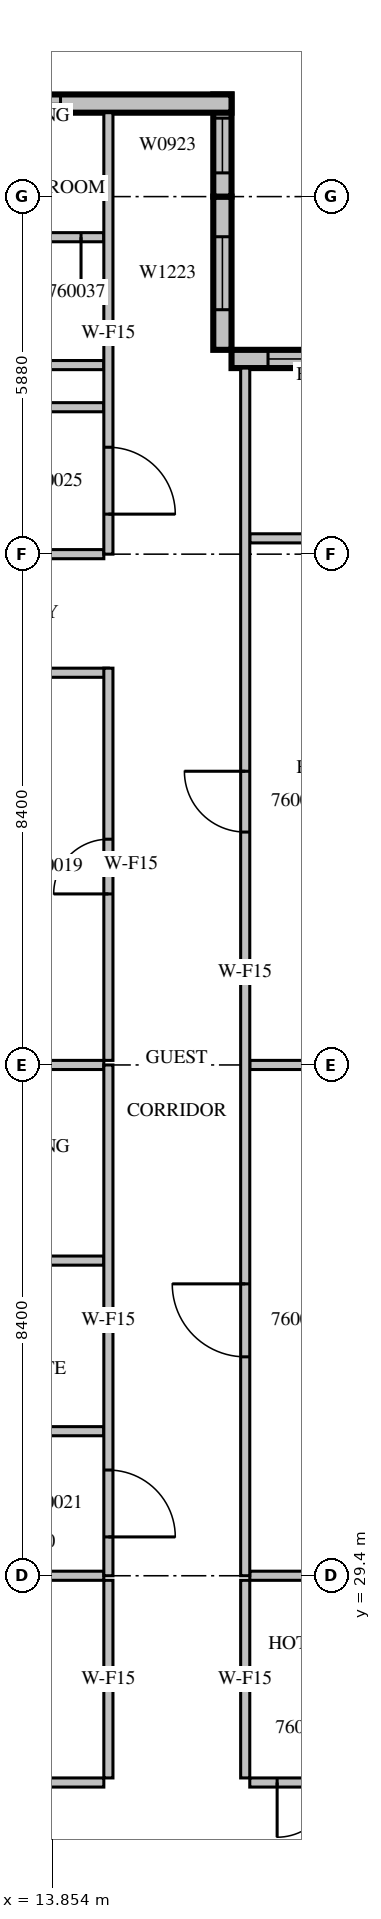
"""IFC4 building model, lengths in metres.
Left out: names, types, materials, properties, quantities, classifications, styles, units other than length and angle.
Written with IfcOpenShell. Run it as: python <this file> out.ifc"""

import sys

from ifc_helpers import new_model, si_unit, direction, frame, frame_2d, origin, place, context, subcontext, project, spatial, rectangle, extrude, source, transform, mapped, element, fill, save


model = new_model("IFC4")
c1 = context("Model", 3, precision=1e-05, world=origin(), true_north=direction((0.0, 1.0)))
c2 = subcontext(c1, "Body", "Model", "MODEL_VIEW")
j1 = project(units=[si_unit("LENGTHUNIT", "METRE"), si_unit("PLANEANGLEUNIT", "RADIAN")], contexts=[c1])
p1 = place(None, origin())
s1 = spatial("IfcSite", under=j1, at=p1, CompositionType="ELEMENT")
p2 = place(p1, origin())
s2 = spatial("IfcBuilding", under=s1, at=p2, CompositionType="ELEMENT")
p3 = place(p2, frame((0.0, 0.0, 261.4)))
s3 = spatial("IfcBuildingStorey", under=s2, at=p3, CompositionType="ELEMENT", Elevation=261.4)
m1 = source(origin(), c2, "Body", "SweptSolid", [
    extrude(rectangle(XDim=4.2, YDim=0.3, at=frame_2d((2.1, 0.0))), origin(), (0.0, 0.0, 1.0), 3.4),
])
p4 = place(p3, frame((21.0, 49.41, 0.0), z_axis=(0.0, 0.0, 1.0), x_axis=(-1.0, 0.0, 0.0)))
e1 = element("IfcWall", 1, at=p4, inside=s3, PredefinedType="STANDARD", context=c2, shape_type="MappedRepresentation", body=[
    mapped(m1, transform((0.0, 0.0, 0.0), scale=1.0)),
])
m2 = source(origin(), c2, "Body", "SweptSolid", [
    extrude(rectangle(XDim=3.0, YDim=2.3, at=frame_2d((1.5, 1.15))), frame((0.0, 0.16, 0.0), z_axis=(0.0, -1.0, 0.0), x_axis=(1.0, 0.0, 0.0)), (0.0, 0.0, 1.0), 0.32),
])
p5 = place(p4, frame((0.6, 0.0, 0.6)))
e2 = element("IfcOpeningElement", 2, at=p5, cuts=e1, PredefinedType="OPENING", context=c2, shape_type="MappedRepresentation", body=[
    mapped(m2, transform((0.0, 0.0, 0.0), scale=1.0)),
])
m3 = source(origin(), c2, "Body", "SweptSolid", [
    extrude(rectangle(XDim=2.52, YDim=0.3, at=frame_2d((1.26, 0.0))), origin(), (0.0, 0.0, 1.0), 3.4),
])
p6 = place(p3, frame((16.65, 49.56, 0.0), z_axis=(0.0, 0.0, 1.0), x_axis=(0.0, 1.0, 0.0)))
e3 = element("IfcWall", 3, at=p6, inside=s3, PredefinedType="STANDARD", context=c2, shape_type="MappedRepresentation", body=[
    mapped(m3, transform((0.0, 0.0, 0.0), scale=1.0)),
])
m4 = source(origin(), c2, "Body", "SweptSolid", [
    extrude(rectangle(XDim=1.2, YDim=2.3, at=frame_2d((0.6, 1.15))), frame((0.0, 0.16, 0.0), z_axis=(0.0, -1.0, 0.0), x_axis=(1.0, 0.0, 0.0)), (0.0, 0.0, 1.0), 0.32),
])
p7 = place(p6, frame((0.66, 0.0, 0.6)))
e4 = element("IfcOpeningElement", 4, at=p7, cuts=e3, PredefinedType="OPENING", context=c2, shape_type="MappedRepresentation", body=[
    mapped(m4, transform((0.0, 0.0, 0.0), scale=1.0)),
])
m5 = source(origin(), c2, "Body", "SweptSolid", [
    extrude(rectangle(XDim=1.68, YDim=0.3, at=frame_2d((0.84, 0.0))), origin(), (0.0, 0.0, 1.0), 3.4),
])
p8 = place(p3, frame((16.65, 52.08, 0.0), z_axis=(0.0, 0.0, 1.0), x_axis=(0.0, 1.0, 0.0)))
e5 = element("IfcWall", 5, at=p8, inside=s3, PredefinedType="STANDARD", context=c2, shape_type="MappedRepresentation", body=[
    mapped(m5, transform((0.0, 0.0, 0.0), scale=1.0)),
])
m6 = source(origin(), c2, "Body", "SweptSolid", [
    extrude(rectangle(XDim=0.9, YDim=2.3, at=frame_2d((0.45, 1.15))), frame((0.0, 0.16, 0.0), z_axis=(0.0, -1.0, 0.0), x_axis=(1.0, 0.0, 0.0)), (0.0, 0.0, 1.0), 0.32),
])
p9 = place(p8, frame((0.39, 0.0, 0.6)))
e6 = element("IfcOpeningElement", 6, at=p9, cuts=e5, PredefinedType="OPENING", context=c2, shape_type="MappedRepresentation", body=[
    mapped(m6, transform((0.0, 0.0, 0.0), scale=1.0)),
])
m7 = source(origin(), c2, "Body", "SweptSolid", [
    extrude(rectangle(XDim=10.5, YDim=0.3, at=frame_2d((5.25, 0.0))), origin(), (0.0, 0.0, 1.0), 3.4),
])
p10 = place(p3, frame((16.8, 53.61, 0.0), z_axis=(0.0, 0.0, 1.0), x_axis=(-1.0, 0.0, 0.0)))
e7 = element("IfcWall", 7, at=p10, inside=s3, PredefinedType="STANDARD", context=c2, shape_type="MappedRepresentation", body=[
    mapped(m7, transform((0.0, 0.0, 0.0), scale=1.0)),
])
m8 = source(origin(), c2, "Body", "SweptSolid", [
    extrude(rectangle(XDim=1.8, YDim=2.3, at=frame_2d((0.9, 1.15))), frame((0.0, 0.16, 0.0), z_axis=(0.0, -1.0, 0.0), x_axis=(1.0, 0.0, 0.0)), (0.0, 0.0, 1.0), 0.32),
])
p11 = place(p10, frame((8.025, 0.0, 0.6)))
e8 = element("IfcOpeningElement", 8, at=p11, cuts=e7, PredefinedType="OPENING", context=c2, shape_type="MappedRepresentation", body=[
    mapped(m8, transform((0.0, 0.0, 0.0), scale=1.0)),
])
m9 = source(origin(), c2, "Body", "SweptSolid", [
    extrude(rectangle(XDim=2.4, YDim=2.3, at=frame_2d((1.2, 1.15))), frame((0.0, 0.16, 0.0), z_axis=(0.0, -1.0, 0.0), x_axis=(1.0, 0.0, 0.0)), (0.0, 0.0, 1.0), 0.32),
])
p12 = place(p10, frame((2.812, 0.0, 0.6)))
e9 = element("IfcOpeningElement", 9, at=p12, cuts=e7, PredefinedType="OPENING", context=c2, shape_type="MappedRepresentation", body=[
    mapped(m9, transform((0.0, 0.0, 0.0), scale=1.0)),
])
m10 = source(origin(), c2, "Body", "SweptSolid", [
    extrude(rectangle(XDim=8.195, YDim=0.15, at=frame_2d((4.098, 0.0))), origin(), (0.0, 0.0, 1.0), 3.4),
])
p13 = place(p3, frame((6.505, 26.0, 0.0), z_axis=(0.0, 0.0, 1.0), x_axis=(1.0, 0.0, 0.0)))
e10 = element("IfcWall", 10, at=p13, inside=s3, PredefinedType="PARTITIONING", context=c2, shape_type="MappedRepresentation", body=[
    mapped(m10, transform((0.0, 0.0, 0.0), scale=1.0)),
])
m11 = source(origin(), c2, "Body", "SweptSolid", [
    extrude(rectangle(XDim=0.9, YDim=2.1, at=frame_2d((0.45, 1.05))), frame((0.0, 0.085, 0.0), z_axis=(0.0, -1.0, 0.0), x_axis=(1.0, 0.0, 0.0)), (0.0, 0.0, 1.0), 0.17),
])
p14 = place(p13, frame((0.695, 0.0, 0.0)))
e11 = element("IfcOpeningElement", 11, at=p14, cuts=e10, PredefinedType="OPENING", context=c2, shape_type="MappedRepresentation", body=[
    mapped(m11, transform((0.0, 0.0, 0.0), scale=1.0)),
])
p15 = place(p13, frame((5.62, 0.0, 0.0)))
e12 = element("IfcOpeningElement", 12, at=p15, cuts=e10, PredefinedType="OPENING", context=c2, shape_type="MappedRepresentation", body=[
    mapped(m11, transform((0.0, 0.0, 0.0), scale=1.0)),
])
m12 = source(origin(), c2, "Body", "SweptSolid", [
    extrude(rectangle(XDim=3.6, YDim=0.15, at=frame_2d((1.8, 0.0))), origin(), (0.0, 0.0, 1.0), 3.4),
])
p16 = place(p3, frame((17.1, 26.0, 0.0), z_axis=(0.0, 0.0, 1.0), x_axis=(1.0, 0.0, 0.0)))
e13 = element("IfcWall", 13, at=p16, inside=s3, PredefinedType="PARTITIONING", context=c2, shape_type="MappedRepresentation", body=[
    mapped(m12, transform((0.0, 0.0, 0.0), scale=1.0)),
])
p17 = place(p16, frame((0.45, 0.0, 0.0)))
e14 = element("IfcOpeningElement", 14, at=p17, cuts=e13, PredefinedType="OPENING", context=c2, shape_type="MappedRepresentation", body=[
    mapped(m11, transform((0.0, 0.0, 0.0), scale=1.0)),
])
m13 = source(origin(), c2, "Body", "SweptSolid", [
    extrude(rectangle(XDim=3.25, YDim=0.15, at=frame_2d((1.625, 0.0))), origin(), (0.0, 0.0, 1.0), 3.4),
])
for number, where, z_axis, x_axis in (
    (15, (14.775, 26.075, 0.0), (0.0, 0.0, 1.0), (0.0, 1.0, 0.0)),
    (16, (17.025, 29.325, 0.0), (0.0, 0.0, 1.0), (0.0, -1.0, 0.0)),
):
    element("IfcWall", number, at=place(p3, frame(where, z_axis=z_axis, x_axis=x_axis)), inside=s3, PredefinedType="PARTITIONING", context=c2, shape_type="MappedRepresentation", body=[
        mapped(m13, transform((0.0, 0.0, 0.0), scale=1.0)),
    ])
m14 = source(origin(), c2, "Body", "SweptSolid", [
    extrude(rectangle(XDim=3.801, YDim=0.15, at=frame_2d((1.901, 0.0))), origin(), (0.0, 0.0, 1.0), 3.4),
])
p18 = place(p3, frame((14.7, 29.4, 0.0), z_axis=(0.0, 0.0, 1.0), x_axis=(-1.0, 0.0, 0.0)))
e17 = element("IfcWall", 17, at=p18, inside=s3, PredefinedType="PARTITIONING", context=c2, shape_type="MappedRepresentation", body=[
    mapped(m14, transform((0.0, 0.0, 0.0), scale=1.0)),
])
m15 = source(origin(), c2, "Body", "SweptSolid", [
    extrude(rectangle(XDim=3.101, YDim=0.15, at=frame_2d((1.55, 0.0))), origin(), (0.0, 0.0, 1.0), 3.4),
])
p19 = place(p3, frame((20.201, 29.4, 0.0), z_axis=(0.0, 0.0, 1.0), x_axis=(-1.0, 0.0, 0.0)))
e18 = element("IfcWall", 18, at=p19, inside=s3, PredefinedType="PARTITIONING", context=c2, shape_type="MappedRepresentation", body=[
    mapped(m15, transform((0.0, 0.0, 0.0), scale=1.0)),
])
m16 = source(origin(), c2, "Body", "SweptSolid", [
    extrude(rectangle(XDim=3.675, YDim=0.15, at=frame_2d((1.837, 0.0))), origin(), (0.0, 0.0, 1.0), 3.4),
])
p20 = place(p3, frame((14.775, 44.25, 0.0), z_axis=(0.0, 0.0, 1.0), x_axis=(-1.0, 0.0, 0.0)))
e19 = element("IfcWall", 19, at=p20, inside=s3, PredefinedType="PARTITIONING", context=c2, shape_type="MappedRepresentation", body=[
    mapped(m16, transform((0.0, 0.0, 0.0), scale=1.0)),
])
m17 = source(origin(), c2, "Body", "SweptSolid", [
    extrude(rectangle(XDim=6.45, YDim=0.15, at=frame_2d((3.225, 0.0))), origin(), (0.0, 0.0, 1.0), 3.4),
])
p21 = place(p3, frame((14.775, 37.875, 0.0), z_axis=(0.0, 0.0, 1.0), x_axis=(0.0, 1.0, 0.0)))
e20 = element("IfcWall", 20, at=p21, inside=s3, PredefinedType="PARTITIONING", context=c2, shape_type="MappedRepresentation", body=[
    mapped(m17, transform((0.0, 0.0, 0.0), scale=1.0)),
])
p22 = place(p21, frame((2.737, 0.0, 0.0)))
e21 = element("IfcOpeningElement", 21, at=p22, cuts=e20, PredefinedType="OPENING", context=c2, shape_type="MappedRepresentation", body=[
    mapped(m11, transform((0.0, 0.0, 0.0), scale=1.0)),
])
m18 = source(origin(), c2, "Body", "SweptSolid", [
    extrude(rectangle(XDim=3.65, YDim=0.15, at=frame_2d((1.825, 0.0))), origin(), (0.0, 0.0, 1.0), 3.4),
])
for number, where, z_axis, x_axis in (
    (22, (14.7, 31.777, 0.0), (0.0, 0.0, 1.0), (-1.0, 0.0, 0.0)),
    (23, (14.7, 34.583, 0.0), (0.0, 0.0, 1.0), (-1.0, 0.0, 0.0)),
    (24, (14.7, 37.8, 0.0), (0.0, 0.0, 1.0), (-1.0, 0.0, 0.0)),
    (25, (14.7, 48.617, 0.0), (0.0, 0.0, 1.0), (-1.0, 0.0, 0.0)),
    (26, (14.7, 49.309, 0.0), (0.0, 0.0, 1.0), (-1.0, 0.0, 0.0)),
):
    element("IfcWall", number, at=place(p3, frame(where, z_axis=z_axis, x_axis=x_axis)), inside=s3, PredefinedType="PARTITIONING", context=c2, shape_type="MappedRepresentation", body=[
        mapped(m18, transform((0.0, 0.0, 0.0), scale=1.0)),
    ])
p23 = place(p3, frame((14.7, 51.412, 0.0), z_axis=(0.0, 0.0, 1.0), x_axis=(-1.0, 0.0, 0.0)))
e27 = element("IfcWall", 27, at=p23, inside=s3, PredefinedType="PARTITIONING", context=c2, shape_type="MappedRepresentation", body=[
    mapped(m18, transform((0.0, 0.0, 0.0), scale=1.0)),
])
p24 = place(p23, frame((1.375, 0.0, 0.0)))
e28 = element("IfcOpeningElement", 28, at=p24, cuts=e27, PredefinedType="OPENING", context=c2, shape_type="MappedRepresentation", body=[
    mapped(m11, transform((0.0, 0.0, 0.0), scale=1.0)),
])
p25 = place(p23, frame((0.375, 0.0, 0.0)))
e29 = element("IfcOpeningElement", 29, at=p25, cuts=e27, PredefinedType="OPENING", context=c2, shape_type="MappedRepresentation", body=[
    mapped(m11, transform((0.0, 0.0, 0.0), scale=1.0)),
])
p26 = place(p23, frame((2.375, 0.0, 0.0)))
e30 = element("IfcOpeningElement", 30, at=p26, cuts=e27, PredefinedType="OPENING", context=c2, shape_type="MappedRepresentation", body=[
    mapped(m11, transform((0.0, 0.0, 0.0), scale=1.0)),
])
p27 = place(p3, frame((14.7, 46.2, 0.0), z_axis=(0.0, 0.0, 1.0), x_axis=(-1.0, 0.0, 0.0)))
e31 = element("IfcWall", 31, at=p27, inside=s3, PredefinedType="PARTITIONING", context=c2, shape_type="MappedRepresentation", body=[
    mapped(m18, transform((0.0, 0.0, 0.0), scale=1.0)),
])
p28 = place(p3, frame((17.1, 46.46, 0.0), z_axis=(0.0, 0.0, 1.0), x_axis=(1.0, 0.0, 0.0)))
e32 = element("IfcWall", 32, at=p28, inside=s3, PredefinedType="PARTITIONING", context=c2, shape_type="MappedRepresentation", body=[
    mapped(m15, transform((0.0, 0.0, 0.0), scale=1.0)),
])
p29 = place(p28, frame((1.35, 0.0, 0.0)))
e33 = element("IfcOpeningElement", 33, at=p29, cuts=e32, PredefinedType="OPENING", context=c2, shape_type="MappedRepresentation", body=[
    mapped(m11, transform((0.0, 0.0, 0.0), scale=1.0)),
])
p30 = place(p3, frame((20.201, 37.8, 0.0), z_axis=(0.0, 0.0, 1.0), x_axis=(-1.0, 0.0, 0.0)))
e34 = element("IfcWall", 34, at=p30, inside=s3, PredefinedType="PARTITIONING", context=c2, shape_type="MappedRepresentation", body=[
    mapped(m15, transform((0.0, 0.0, 0.0), scale=1.0)),
])
m19 = source(origin(), c2, "Body", "SweptSolid", [
    extrude(rectangle(XDim=8.4, YDim=0.15, at=frame_2d((4.2, 0.0))), origin(), (0.0, 0.0, 1.0), 3.4),
])
p31 = place(p3, frame((14.775, 29.4, 0.0), z_axis=(0.0, 0.0, 1.0), x_axis=(0.0, 1.0, 0.0)))
e35 = element("IfcWall", 35, at=p31, inside=s3, PredefinedType="PARTITIONING", context=c2, shape_type="MappedRepresentation", body=[
    mapped(m19, transform((0.0, 0.0, 0.0), scale=1.0)),
])
m20 = source(origin(), c2, "Body", "SweptSolid", [
    extrude(rectangle(XDim=1.1, YDim=2.1, at=frame_2d((0.55, 1.05))), frame((0.0, 0.085, 0.0), z_axis=(0.0, -1.0, 0.0), x_axis=(1.0, 0.0, 0.0)), (0.0, 0.0, 1.0), 0.17),
])
p32 = place(p31, frame((0.638, 0.0, 0.0)))
e36 = element("IfcOpeningElement", 36, at=p32, cuts=e35, PredefinedType="OPENING", context=c2, shape_type="MappedRepresentation", body=[
    mapped(m20, transform((0.0, 0.0, 0.0), scale=1.0)),
])
m21 = source(origin(), c2, "Body", "SweptSolid", [
    extrude(rectangle(XDim=7.26, YDim=0.15, at=frame_2d((3.63, 0.0))), origin(), (0.0, 0.0, 1.0), 3.4),
])
p33 = place(p3, frame((14.775, 46.2, 0.0), z_axis=(0.0, 0.0, 1.0), x_axis=(0.0, 1.0, 0.0)))
e37 = element("IfcWall", 37, at=p33, inside=s3, PredefinedType="PARTITIONING", context=c2, shape_type="MappedRepresentation", body=[
    mapped(m21, transform((0.0, 0.0, 0.0), scale=1.0)),
])
p34 = place(p33, frame((0.658, 0.0, 0.0)))
e38 = element("IfcOpeningElement", 38, at=p34, cuts=e37, PredefinedType="OPENING", context=c2, shape_type="MappedRepresentation", body=[
    mapped(m20, transform((0.0, 0.0, 0.0), scale=1.0)),
])
m22 = source(origin(), c2, "Body", "SweptSolid", [
    extrude(rectangle(XDim=19.86, YDim=0.15, at=frame_2d((9.93, 0.0))), origin(), (0.0, 0.0, 1.0), 3.4),
])
p35 = place(p3, frame((17.025, 49.26, 0.0), z_axis=(0.0, 0.0, 1.0), x_axis=(0.0, -1.0, 0.0)))
e39 = element("IfcWall", 39, at=p35, inside=s3, PredefinedType="PARTITIONING", context=c2, shape_type="MappedRepresentation", body=[
    mapped(m22, transform((0.0, 0.0, 0.0), scale=1.0)),
])
m23 = source(origin(), c2, "Body", "SweptSolid", [
    extrude(rectangle(XDim=1.2, YDim=2.1, at=frame_2d((0.6, 1.05))), frame((0.0, 0.085, 0.0), z_axis=(0.0, -1.0, 0.0), x_axis=(1.0, 0.0, 0.0)), (0.0, 0.0, 1.0), 0.17),
])
p36 = place(p35, frame((15.06, 0.0, 0.0)))
e40 = element("IfcOpeningElement", 40, at=p36, cuts=e39, PredefinedType="OPENING", context=c2, shape_type="MappedRepresentation", body=[
    mapped(m23, transform((0.0, 0.0, 0.0), scale=1.0)),
])
m24 = source(origin(), c2, "Body", "SweptSolid", [
    extrude(rectangle(XDim=1.0, YDim=2.1, at=frame_2d((0.5, 1.05))), frame((0.0, 0.085, 0.0), z_axis=(0.0, -1.0, 0.0), x_axis=(1.0, 0.0, 0.0)), (0.0, 0.0, 1.0), 0.17),
])
p37 = place(p35, frame((6.63, 0.0, 0.0)))
e41 = element("IfcOpeningElement", 41, at=p37, cuts=e39, PredefinedType="OPENING", context=c2, shape_type="MappedRepresentation", body=[
    mapped(m24, transform((0.0, 0.0, 0.0), scale=1.0)),
])
m25 = source(origin(), c2, "Body", "SweptSolid", [
    extrude(rectangle(XDim=3.0, YDim=2.3, at=frame_2d((1.5, 1.15))), frame((0.0, 0.03, 0.0), z_axis=(0.0, -1.0, 0.0), x_axis=(1.0, 0.0, 0.0)), (0.0, 0.0, 1.0), 0.06),
])
p38 = place(p5, origin())
e42 = element("IfcWindow", 42, at=p38, inside=s3, PartitioningType="SINGLE_PANEL", PredefinedType="WINDOW", context=c2, shape_type="MappedRepresentation", body=[
    mapped(m25, transform((0.0, 0.0, 0.0), scale=1.0)),
])
fill(e2, e42)
m26 = source(origin(), c2, "Body", "SweptSolid", [
    extrude(rectangle(XDim=1.2, YDim=2.3, at=frame_2d((0.6, 1.15))), frame((0.0, 0.03, 0.0), z_axis=(0.0, -1.0, 0.0), x_axis=(1.0, 0.0, 0.0)), (0.0, 0.0, 1.0), 0.06),
])
p39 = place(p7, origin())
e43 = element("IfcWindow", 43, at=p39, inside=s3, PartitioningType="SINGLE_PANEL", PredefinedType="WINDOW", context=c2, shape_type="MappedRepresentation", body=[
    mapped(m26, transform((0.0, 0.0, 0.0), scale=1.0)),
])
fill(e4, e43)
m27 = source(origin(), c2, "Body", "SweptSolid", [
    extrude(rectangle(XDim=0.9, YDim=2.3, at=frame_2d((0.45, 1.15))), frame((0.0, 0.03, 0.0), z_axis=(0.0, -1.0, 0.0), x_axis=(1.0, 0.0, 0.0)), (0.0, 0.0, 1.0), 0.06),
])
p40 = place(p9, origin())
e44 = element("IfcWindow", 44, at=p40, inside=s3, PartitioningType="SINGLE_PANEL", PredefinedType="WINDOW", context=c2, shape_type="MappedRepresentation", body=[
    mapped(m27, transform((0.0, 0.0, 0.0), scale=1.0)),
])
fill(e6, e44)
m28 = source(origin(), c2, "Body", "SweptSolid", [
    extrude(rectangle(XDim=2.4, YDim=2.3, at=frame_2d((1.2, 1.15))), frame((0.0, 0.03, 0.0), z_axis=(0.0, -1.0, 0.0), x_axis=(1.0, 0.0, 0.0)), (0.0, 0.0, 1.0), 0.06),
])
p41 = place(p12, origin())
e45 = element("IfcWindow", 45, at=p41, inside=s3, PartitioningType="SINGLE_PANEL", PredefinedType="WINDOW", context=c2, shape_type="MappedRepresentation", body=[
    mapped(m28, transform((0.0, 0.0, 0.0), scale=1.0)),
])
fill(e9, e45)
m29 = source(origin(), c2, "Body", "SweptSolid", [
    extrude(rectangle(XDim=0.9, YDim=2.1, at=frame_2d((0.45, 1.05))), frame((0.0, 0.025, 0.0), z_axis=(0.0, -1.0, 0.0), x_axis=(1.0, 0.0, 0.0)), (0.0, 0.0, 1.0), 0.05),
])
p42 = place(p17, origin())
e46 = element("IfcDoor", 46, at=p42, inside=s3, OperationType="SINGLE_SWING_RIGHT", PredefinedType="DOOR", context=c2, shape_type="MappedRepresentation", body=[
    mapped(m29, transform((0.0, 0.0, 0.0), scale=1.0)),
])
fill(e14, e46)
p43 = place(p22, origin())
e47 = element("IfcDoor", 47, at=p43, inside=s3, OperationType="SINGLE_SWING_LEFT", PredefinedType="DOOR", context=c2, shape_type="MappedRepresentation", body=[
    mapped(m29, transform((0.0, 0.0, 0.0), scale=1.0)),
])
fill(e21, e47)
m30 = source(origin(), c2, "Body", "SweptSolid", [
    extrude(rectangle(XDim=1.1, YDim=2.1, at=frame_2d((0.55, 1.05))), frame((0.0, 0.025, 0.0), z_axis=(0.0, -1.0, 0.0), x_axis=(1.0, 0.0, 0.0)), (0.0, 0.0, 1.0), 0.05),
])
p44 = place(p32, origin())
e48 = element("IfcDoor", 48, at=p44, inside=s3, OperationType="SINGLE_SWING_RIGHT", PredefinedType="DOOR", context=c2, shape_type="MappedRepresentation", body=[
    mapped(m30, transform((0.0, 0.0, 0.0), scale=1.0)),
])
fill(e36, e48)
p45 = place(p34, origin())
e49 = element("IfcDoor", 49, at=p45, inside=s3, OperationType="SINGLE_SWING_RIGHT", PredefinedType="DOOR", context=c2, shape_type="MappedRepresentation", body=[
    mapped(m30, transform((0.0, 0.0, 0.0), scale=1.0)),
])
fill(e38, e49)
m31 = source(origin(), c2, "Body", "SweptSolid", [
    extrude(rectangle(XDim=1.2, YDim=2.1, at=frame_2d((0.6, 1.05))), frame((0.0, 0.025, 0.0), z_axis=(0.0, -1.0, 0.0), x_axis=(1.0, 0.0, 0.0)), (0.0, 0.0, 1.0), 0.05),
])
p46 = place(p36, origin())
e50 = element("IfcDoor", 50, at=p46, inside=s3, OperationType="SINGLE_SWING_RIGHT", PredefinedType="DOOR", context=c2, shape_type="MappedRepresentation", body=[
    mapped(m31, transform((0.0, 0.0, 0.0), scale=1.0)),
])
fill(e40, e50)
m32 = source(origin(), c2, "Body", "SweptSolid", [
    extrude(rectangle(XDim=1.0, YDim=2.1, at=frame_2d((0.5, 1.05))), frame((0.0, 0.025, 0.0), z_axis=(0.0, -1.0, 0.0), x_axis=(1.0, 0.0, 0.0)), (0.0, 0.0, 1.0), 0.05),
])
p47 = place(p37, origin())
e51 = element("IfcDoor", 51, at=p47, inside=s3, OperationType="SINGLE_SWING_RIGHT", PredefinedType="DOOR", context=c2, shape_type="MappedRepresentation", body=[
    mapped(m32, transform((0.0, 0.0, 0.0), scale=1.0)),
])
fill(e41, e51)
p48 = place(p25, origin())
e52 = element("IfcDoor", 52, at=p48, inside=s3, OperationType="SINGLE_SWING_LEFT", PredefinedType="DOOR", context=c2, shape_type="MappedRepresentation", body=[
    mapped(m29, transform((0.0, 0.0, 0.0), scale=1.0)),
])
fill(e29, e52)
save(model, sys.argv[1])
